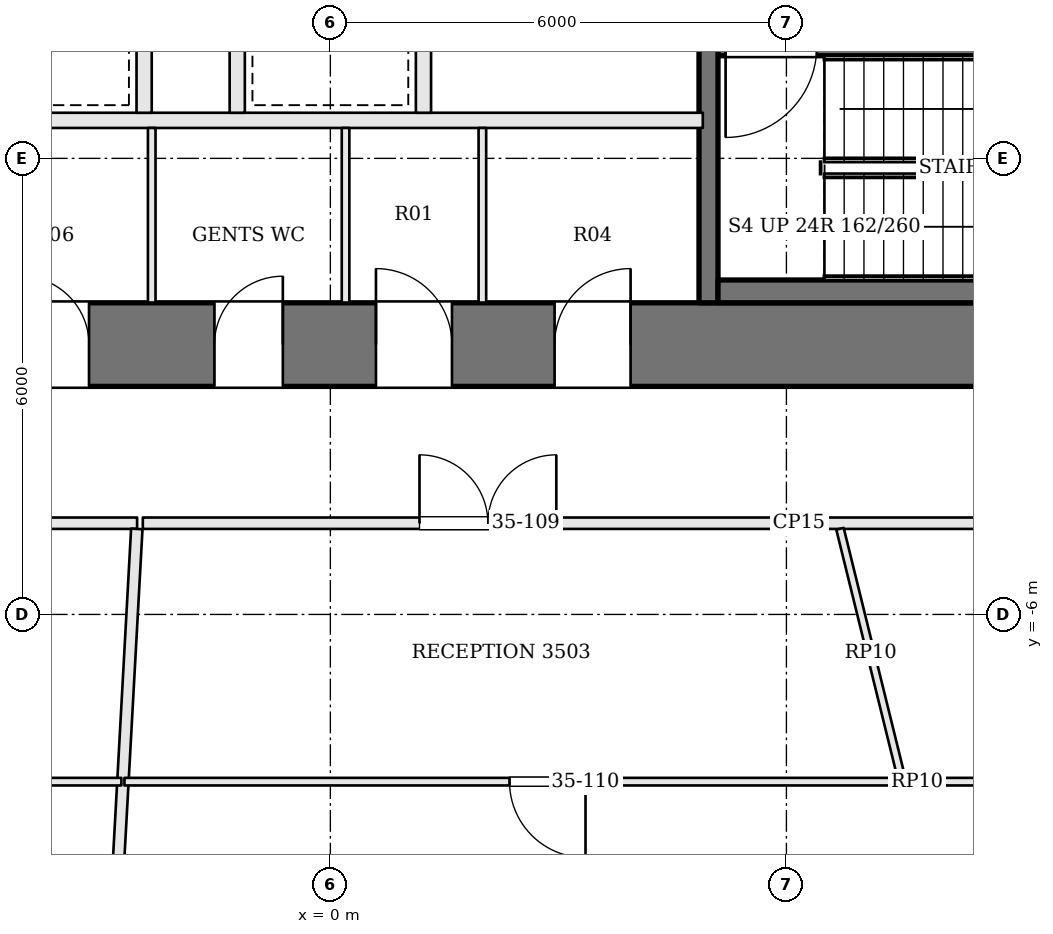
"""IFC4 building model, lengths in metres.
Left out: names, types, materials, properties, quantities, classifications, styles, units other than length and angle.
Written with IfcOpenShell. Run it as: python <this file> out.ifc"""

import sys

from ifc_helpers import new_model, si_unit, direction, frame, frame_2d, origin, place, context, subcontext, project, spatial, rectangle, extrude, element, fill, save


model = new_model("IFC4")
c1 = context("Model", 3, precision=1e-05, world=origin(), true_north=direction((0.0, 1.0)))
c2 = subcontext(c1, "Body", "Model", "MODEL_VIEW")
j1 = project(units=[si_unit("LENGTHUNIT", "METRE"), si_unit("PLANEANGLEUNIT", "RADIAN")], contexts=[c1])
p1 = place(None, origin())
s1 = spatial("IfcSite", under=j1, at=p1, CompositionType="ELEMENT")
p2 = place(p1, origin())
s2 = spatial("IfcBuilding", under=s1, at=p2, CompositionType="ELEMENT")
p3 = place(p2, frame((0.0, 0.0, 146.1)))
s3 = spatial("IfcBuildingStorey", under=s2, at=p3, CompositionType="ELEMENT", Elevation=146.1)
p4 = place(p3, frame((-13.0, -2.45, 0.0), z_axis=(0.0, 0.0, 1.0), x_axis=(1.0, 0.0, 0.0)))
e1 = element("IfcWall", 1, at=p4, inside=s3, PredefinedType="SHEAR", context=c2, shape_type="SweptSolid", body=[
    extrude(rectangle(XDim=26.0, YDim=1.1, at=frame_2d((13.0, 0.0))), origin(), (0.0, 0.0, 1.0), 3.9),
])
p5 = place(p4, frame((8.925, 0.0, 0.0)))
e2 = element("IfcOpeningElement", 2, at=p5, cuts=e1, PredefinedType="OPENING", context=c2, shape_type="SweptSolid", body=[
    extrude(rectangle(XDim=0.9, YDim=2.1, at=frame_2d((0.45, 1.05))), frame((0.0, 0.56, 0.0), z_axis=(0.0, -1.0, 0.0), x_axis=(1.0, 0.0, 0.0)), (0.0, 0.0, 1.0), 1.12),
])
p6 = place(p4, frame((11.475, 0.0, 0.0)))
e3 = element("IfcOpeningElement", 3, at=p6, cuts=e1, PredefinedType="OPENING", context=c2, shape_type="SweptSolid", body=[
    extrude(rectangle(XDim=0.9, YDim=2.1, at=frame_2d((0.45, 1.05))), frame((0.0, 0.56, 0.0), z_axis=(0.0, -1.0, 0.0), x_axis=(1.0, 0.0, 0.0)), (0.0, 0.0, 1.0), 1.12),
])
p7 = place(p4, frame((13.6, 0.0, 0.0)))
e4 = element("IfcOpeningElement", 4, at=p7, cuts=e1, PredefinedType="OPENING", context=c2, shape_type="SweptSolid", body=[
    extrude(rectangle(XDim=1.0, YDim=2.1, at=frame_2d((0.5, 1.05))), frame((0.0, 0.56, 0.0), z_axis=(0.0, -1.0, 0.0), x_axis=(1.0, 0.0, 0.0)), (0.0, 0.0, 1.0), 1.12),
])
p8 = place(p4, frame((15.95, 0.0, 0.0)))
e5 = element("IfcOpeningElement", 5, at=p8, cuts=e1, PredefinedType="OPENING", context=c2, shape_type="SweptSolid", body=[
    extrude(rectangle(XDim=1.0, YDim=2.1, at=frame_2d((0.5, 1.05))), frame((0.0, 0.56, 0.0), z_axis=(0.0, -1.0, 0.0), x_axis=(1.0, 0.0, 0.0)), (0.0, 0.0, 1.0), 1.12),
])
p9 = place(p3, frame((11.9, 1.475, 0.0), z_axis=(0.0, 0.0, 1.0), x_axis=(-1.0, 0.0, 0.0)))
e6 = element("IfcWall", 6, at=p9, inside=s3, PredefinedType="SOLIDWALL", context=c2, shape_type="SweptSolid", body=[
    extrude(rectangle(XDim=6.8, YDim=0.25, at=frame_2d((3.4, 0.0))), origin(), (0.0, 0.0, 1.0), 3.7),
])
p10 = place(p9, frame((5.5, 0.0, 0.0)))
e7 = element("IfcOpeningElement", 7, at=p10, cuts=e6, PredefinedType="OPENING", context=c2, shape_type="SweptSolid", body=[
    extrude(rectangle(XDim=1.2, YDim=2.1, at=frame_2d((0.6, 1.05))), frame((0.0, 0.135, 0.0), z_axis=(0.0, -1.0, 0.0), x_axis=(1.0, 0.0, 0.0)), (0.0, 0.0, 1.0), 0.27),
])
p11 = place(p3, frame((4.975, 10.9, 0.0), z_axis=(0.0, 0.0, 1.0), x_axis=(0.0, -1.0, 0.0)))
e8 = element("IfcWall", 8, at=p11, inside=s3, PredefinedType="SOLIDWALL", context=c2, shape_type="SweptSolid", body=[
    extrude(rectangle(XDim=12.8, YDim=0.25, at=frame_2d((6.4, 0.0))), origin(), (0.0, 0.0, 1.0), 3.7),
])
p12 = place(p11, frame((4.95, 0.0, 0.0)))
e9 = element("IfcOpeningElement", 9, at=p12, cuts=e8, PredefinedType="OPENING", context=c2, shape_type="SweptSolid", body=[
    extrude(rectangle(XDim=1.2, YDim=2.1, at=frame_2d((0.6, 1.05))), frame((0.0, 0.135, 0.0), z_axis=(0.0, -1.0, 0.0), x_axis=(1.0, 0.0, 0.0)), (0.0, 0.0, 1.0), 0.27),
])
p13 = place(p3, frame((11.9, -1.75, 0.0), z_axis=(0.0, 0.0, 1.0), x_axis=(-1.0, 0.0, 0.0)))
e10 = element("IfcWall", 10, at=p13, inside=s3, PredefinedType="SOLIDWALL", context=c2, shape_type="SweptSolid", body=[
    extrude(rectangle(XDim=6.8, YDim=0.3, at=frame_2d((3.4, 0.0))), origin(), (0.0, 0.0, 1.0), 3.7),
])
p14 = place(p3, frame((-4.9, 0.5, 0.0), z_axis=(0.0, 0.0, 1.0), x_axis=(1.0, 0.0, 0.0)))
e11 = element("IfcWall", 11, at=p14, inside=s3, PredefinedType="SOLIDWALL", context=c2, shape_type="SweptSolid", body=[
    extrude(rectangle(XDim=9.8, YDim=0.2, at=frame_2d((4.9, 0.0))), origin(), (0.0, 0.0, 1.0), 3.7),
])
for number, where, z_axis, x_axis in (
    (12, (-2.45, 0.6, 0.0), (0.0, 0.0, 1.0), (0.0, 1.0, 0.0)),
    (13, (-1.225, 0.6, 0.0), (0.0, 0.0, 1.0), (0.0, 1.0, 0.0)),
    (14, (1.225, 0.6, 0.0), (0.0, 0.0, 1.0), (0.0, 1.0, 0.0)),
):
    element("IfcWall", number, at=place(p3, frame(where, z_axis=z_axis, x_axis=x_axis)), inside=s3, PredefinedType="SOLIDWALL", context=c2, shape_type="SweptSolid", body=[
        extrude(rectangle(XDim=2.2, YDim=0.2, at=frame_2d((1.1, 0.0))), origin(), (0.0, 0.0, 1.0), 3.7),
    ])
for number, where, z_axis, x_axis in (
    (15, (-2.35, -1.9, 0.0), (0.0, 0.0, 1.0), (0.0, 1.0, 0.0)),
    (16, (0.2, -1.9, 0.0), (0.0, 0.0, 1.0), (0.0, 1.0, 0.0)),
    (17, (2.0, -1.9, 0.0), (0.0, 0.0, 1.0), (0.0, 1.0, 0.0)),
):
    element("IfcWall", number, at=place(p3, frame(where, z_axis=z_axis, x_axis=x_axis)), inside=s3, PredefinedType="PARTITIONING", context=c2, shape_type="SweptSolid", body=[
        extrude(rectangle(XDim=2.3, YDim=0.1, at=frame_2d((1.15, 0.0))), origin(), (0.0, 0.0, 1.0), 3.7),
    ])
p15 = place(p3, frame((-14.725, -4.8, 0.0), z_axis=(0.0, 0.0, 1.0), x_axis=(1.0, 0.0, 0.0)))
e18 = element("IfcWall", 18, at=p15, inside=s3, PredefinedType="PARTITIONING", context=c2, shape_type="SweptSolid", body=[
    extrude(rectangle(XDim=12.183, YDim=0.15, at=frame_2d((6.091, 0.0))), origin(), (0.0, 0.0, 1.0), 3.198),
])
p16 = place(p15, frame((0.43, 0.0, 0.0)))
e19 = element("IfcOpeningElement", 19, at=p16, cuts=e18, PredefinedType="OPENING", context=c2, shape_type="SweptSolid", body=[
    extrude(rectangle(XDim=1.0, YDim=2.4, at=frame_2d((0.5, 1.2))), frame((0.0, 0.085, 0.0), z_axis=(0.0, -1.0, 0.0), x_axis=(1.0, 0.0, 0.0)), (0.0, 0.0, 1.0), 0.17),
])
p17 = place(p15, frame((5.04, 0.0, 0.0)))
e20 = element("IfcOpeningElement", 20, at=p17, cuts=e18, PredefinedType="OPENING", context=c2, shape_type="SweptSolid", body=[
    extrude(rectangle(XDim=1.0, YDim=2.4, at=frame_2d((0.5, 1.2))), frame((0.0, 0.085, 0.0), z_axis=(0.0, -1.0, 0.0), x_axis=(1.0, 0.0, 0.0)), (0.0, 0.0, 1.0), 0.17),
])
p18 = place(p3, frame((-3.347, -19.434, 0.0), z_axis=(0.0, 0.0, 1.0), x_axis=(0.054887619748, 0.998492538379, 0.0)))
e21 = element("IfcWall", 21, at=p18, inside=s3, PredefinedType="PARTITIONING", context=c2, shape_type="SweptSolid", body=[
    extrude(rectangle(XDim=14.581, YDim=0.15, at=frame_2d((7.29, 0.0))), origin(), (0.0, 0.0, 1.0), 3.234),
])
p19 = place(p3, frame((-2.467, -4.8, 0.0), z_axis=(0.0, 0.0, 1.0), x_axis=(1.0, 0.0, 0.0)))
e22 = element("IfcWall", 22, at=p19, inside=s3, PredefinedType="PARTITIONING", context=c2, shape_type="SweptSolid", body=[
    extrude(rectangle(XDim=17.267, YDim=0.15, at=frame_2d((8.634, 0.0))), origin(), (0.0, 0.0, 1.0), 3.198),
])
p20 = place(p19, frame((3.64, 0.0, 0.0)))
e23 = element("IfcOpeningElement", 23, at=p20, cuts=e22, PredefinedType="OPENING", context=c2, shape_type="SweptSolid", body=[
    extrude(rectangle(XDim=1.8, YDim=2.1, at=frame_2d((0.9, 1.05))), frame((0.0, 0.085, 0.0), z_axis=(0.0, -1.0, 0.0), x_axis=(1.0, 0.0, 0.0)), (0.0, 0.0, 1.0), 0.17),
])
p21 = place(p19, frame((11.152, 0.0, 0.0)))
e24 = element("IfcOpeningElement", 24, at=p21, cuts=e22, PredefinedType="OPENING", context=c2, shape_type="SweptSolid", body=[
    extrude(rectangle(XDim=1.0, YDim=2.4, at=frame_2d((0.5, 1.2))), frame((0.0, 0.085, 0.0), z_axis=(0.0, -1.0, 0.0), x_axis=(1.0, 0.0, 0.0)), (0.0, 0.0, 1.0), 0.17),
])
p22 = place(p3, frame((-2.749, -8.2, 0.0), z_axis=(0.0, 0.0, 1.0), x_axis=(-1.0, 0.0, 0.0)))
e25 = element("IfcWall", 25, at=p22, inside=s3, PredefinedType="PARTITIONING", context=c2, shape_type="SweptSolid", body=[
    extrude(rectangle(XDim=15.451, YDim=0.1, at=frame_2d((7.725, 0.0))), origin(), (0.0, 0.0, 1.0), 3.184),
])
p23 = place(p22, frame((1.968, 0.0, 0.0)))
e26 = element("IfcOpeningElement", 26, at=p23, cuts=e25, PredefinedType="OPENING", context=c2, shape_type="SweptSolid", body=[
    extrude(rectangle(XDim=0.9, YDim=2.1, at=frame_2d((0.45, 1.05))), frame((0.0, 0.06, 0.0), z_axis=(0.0, -1.0, 0.0), x_axis=(1.0, 0.0, 0.0)), (0.0, 0.0, 1.0), 0.12),
])
p24 = place(p3, frame((18.15, -8.2, 0.0), z_axis=(0.0, 0.0, 1.0), x_axis=(-1.0, 0.0, 0.0)))
e27 = element("IfcWall", 27, at=p24, inside=s3, PredefinedType="PARTITIONING", context=c2, shape_type="SweptSolid", body=[
    extrude(rectangle(XDim=20.859, YDim=0.1, at=frame_2d((10.43, 0.0))), origin(), (0.0, 0.0, 1.0), 3.184),
])
p25 = place(p24, frame((14.793, 0.0, 0.0)))
e28 = element("IfcOpeningElement", 28, at=p25, cuts=e27, PredefinedType="OPENING", context=c2, shape_type="SweptSolid", body=[
    extrude(rectangle(XDim=1.0, YDim=2.1, at=frame_2d((0.5, 1.05))), frame((0.0, 0.06, 0.0), z_axis=(0.0, -1.0, 0.0), x_axis=(1.0, 0.0, 0.0)), (0.0, 0.0, 1.0), 0.12),
])
p26 = place(p3, frame((6.705, -4.873, 0.0), z_axis=(0.0, 0.0, 1.0), x_axis=(0.239438495926, -0.970911533904, 0.0)))
e29 = element("IfcWall", 29, at=p26, inside=s3, PredefinedType="PARTITIONING", context=c2, shape_type="SweptSolid", body=[
    extrude(rectangle(XDim=3.377, YDim=0.1, at=frame_2d((1.688, 0.0))), origin(), (0.0, 0.0, 1.0), 3.184),
])
p27 = place(p5, origin())
e30 = element("IfcDoor", 30, at=p27, inside=s3, OperationType="SINGLE_SWING_LEFT", PredefinedType="DOOR", context=c2, shape_type="SweptSolid", body=[
    extrude(rectangle(XDim=0.9, YDim=2.1, at=frame_2d((0.45, 1.05))), frame((0.0, 0.025, 0.0), z_axis=(0.0, -1.0, 0.0), x_axis=(1.0, 0.0, 0.0)), (0.0, 0.0, 1.0), 0.05),
])
fill(e2, e30)
p28 = place(p6, origin())
e31 = element("IfcDoor", 31, at=p28, inside=s3, OperationType="SINGLE_SWING_RIGHT", PredefinedType="DOOR", context=c2, shape_type="SweptSolid", body=[
    extrude(rectangle(XDim=0.9, YDim=2.1, at=frame_2d((0.45, 1.05))), frame((0.0, 0.025, 0.0), z_axis=(0.0, -1.0, 0.0), x_axis=(1.0, 0.0, 0.0)), (0.0, 0.0, 1.0), 0.05),
])
fill(e3, e31)
p29 = place(p7, origin())
e32 = element("IfcDoor", 32, at=p29, inside=s3, OperationType="SINGLE_SWING_LEFT", PredefinedType="DOOR", context=c2, shape_type="SweptSolid", body=[
    extrude(rectangle(XDim=1.0, YDim=2.1, at=frame_2d((0.5, 1.05))), frame((0.0, 0.025, 0.0), z_axis=(0.0, -1.0, 0.0), x_axis=(1.0, 0.0, 0.0)), (0.0, 0.0, 1.0), 0.05),
])
fill(e4, e32)
p30 = place(p8, origin())
e33 = element("IfcDoor", 33, at=p30, inside=s3, OperationType="SINGLE_SWING_RIGHT", PredefinedType="DOOR", context=c2, shape_type="SweptSolid", body=[
    extrude(rectangle(XDim=1.0, YDim=2.1, at=frame_2d((0.5, 1.05))), frame((0.0, 0.025, 0.0), z_axis=(0.0, -1.0, 0.0), x_axis=(1.0, 0.0, 0.0)), (0.0, 0.0, 1.0), 0.05),
])
fill(e5, e33)
p31 = place(p20, origin())
e34 = element("IfcDoor", 34, at=p31, inside=s3, OperationType="DOUBLE_DOOR_SINGLE_SWING", PredefinedType="DOOR", context=c2, shape_type="SweptSolid", body=[
    extrude(rectangle(XDim=1.8, YDim=2.1, at=frame_2d((0.9, 1.05))), frame((0.0, 0.025, 0.0), z_axis=(0.0, -1.0, 0.0), x_axis=(1.0, 0.0, 0.0)), (0.0, 0.0, 1.0), 0.05),
])
fill(e23, e34)
p32 = place(p25, origin())
e35 = element("IfcDoor", 35, at=p32, inside=s3, OperationType="SINGLE_SWING_LEFT", PredefinedType="DOOR", context=c2, shape_type="SweptSolid", body=[
    extrude(rectangle(XDim=1.0, YDim=2.1, at=frame_2d((0.5, 1.05))), frame((0.0, 0.025, 0.0), z_axis=(0.0, -1.0, 0.0), x_axis=(1.0, 0.0, 0.0)), (0.0, 0.0, 1.0), 0.05),
])
fill(e28, e35)
save(model, sys.argv[1])
